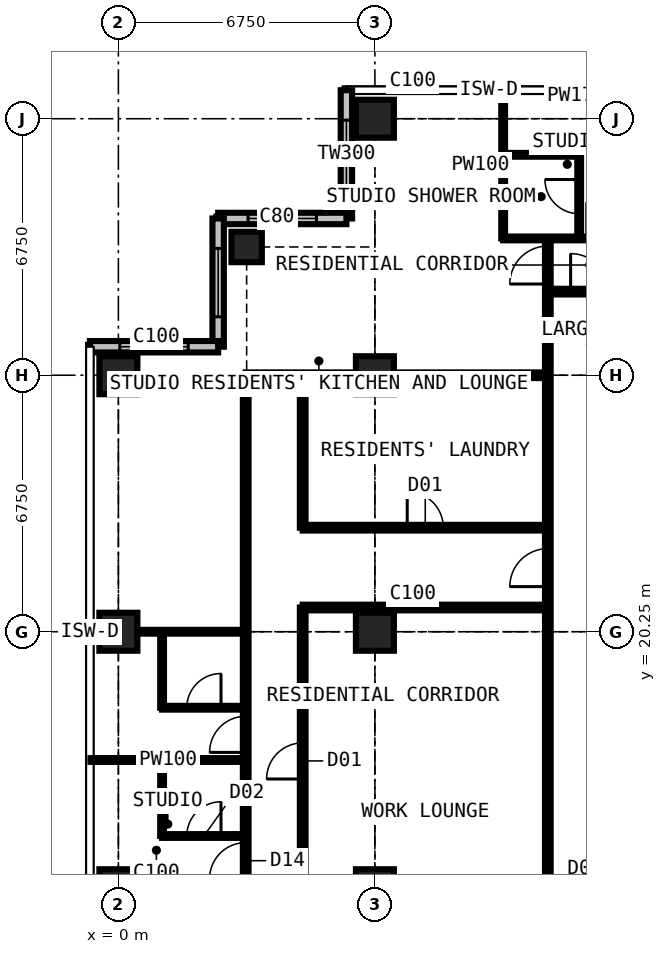
"""IFC4 building model, lengths in metres.
Left out: names, types, materials, properties, quantities, classifications, styles, units other than length and angle.
Written with IfcOpenShell. Run it as: python <this file> out.ifc"""

import sys

from ifc_helpers import new_model, si_unit, direction, frame, frame_2d, origin, origin_2d, place, context, subcontext, project, spatial, rectangle, extrude, element, fill, save


model = new_model("IFC4")
c1 = context("Model", 3, precision=1e-05, world=origin(), true_north=direction((0.0, 1.0)))
c2 = subcontext(c1, "Body", "Model", "MODEL_VIEW")
j1 = project(units=[si_unit("LENGTHUNIT", "METRE"), si_unit("PLANEANGLEUNIT", "RADIAN")], contexts=[c1])
p1 = place(None, origin())
s1 = spatial("IfcSite", under=j1, at=p1, CompositionType="ELEMENT")
p2 = place(p1, origin())
s2 = spatial("IfcBuilding", under=s1, at=p2, CompositionType="ELEMENT")
p3 = place(p2, frame((0.0, 0.0, 247.5)))
s3 = spatial("IfcBuildingStorey", under=s2, at=p3, CompositionType="ELEMENT", Elevation=247.5)
for number, where, z_axis, x_axis in (
    (1, (0.0, 13.5, 0.0), (0.0, 0.0, 1.0), (1.0, 0.0, 0.0)),
    (2, (0.0, 20.25, 0.0), (0.0, 0.0, 1.0), (1.0, 0.0, 0.0)),
    (3, (0.0, 27.0, 0.0), (0.0, 0.0, 1.0), (1.0, 0.0, 0.0)),
):
    element("IfcColumn", number, at=place(p3, frame(where, z_axis=z_axis, x_axis=x_axis)), inside=s3, PredefinedType="COLUMN", context=c2, shape_type="SweptSolid", body=[
        extrude(rectangle(XDim=1.0, YDim=1.0, at=origin_2d()), origin(), (0.0, 0.0, 1.0), 3.6),
    ])
p4 = place(p3, frame((3.375, 30.375, 0.0), z_axis=(0.0, 0.0, 1.0), x_axis=(1.0, 0.0, 0.0)))
e4 = element("IfcColumn", 4, at=p4, inside=s3, PredefinedType="COLUMN", context=c2, shape_type="SweptSolid", body=[
    extrude(rectangle(XDim=0.8, YDim=0.8, at=origin_2d()), origin(), (0.0, 0.0, 1.0), 3.6),
])
for number, where, z_axis, x_axis in (
    (5, (6.75, 13.5, 0.0), (0.0, 0.0, 1.0), (1.0, 0.0, 0.0)),
    (6, (6.75, 20.25, 0.0), (0.0, 0.0, 1.0), (1.0, 0.0, 0.0)),
    (7, (6.75, 27.0, 0.0), (0.0, 0.0, 1.0), (1.0, 0.0, 0.0)),
    (8, (6.75, 33.75, 0.0), (0.0, 0.0, 1.0), (1.0, 0.0, 0.0)),
):
    element("IfcColumn", number, at=place(p3, frame(where, z_axis=z_axis, x_axis=x_axis)), inside=s3, PredefinedType="COLUMN", context=c2, shape_type="SweptSolid", body=[
        extrude(rectangle(XDim=1.0, YDim=1.0, at=origin_2d()), origin(), (0.0, 0.0, 1.0), 3.6),
    ])
p5 = place(p3, frame((6.0, 34.5, 0.0), z_axis=(0.0, 0.0, 1.0), x_axis=(0.0, -1.0, 0.0)))
e9 = element("IfcWall", 9, at=p5, inside=s3, PredefinedType="SOLIDWALL", context=c2, shape_type="SweptSolid", body=[
    extrude(rectangle(XDim=3.375, YDim=0.3, at=frame_2d((1.688, 0.0))), origin(), (0.0, 0.0, 1.0), 3.375),
])
p6 = place(p5, frame((0.788, 0.0, 0.6)))
e10 = element("IfcOpeningElement", 10, at=p6, cuts=e9, PredefinedType="OPENING", context=c2, shape_type="SweptSolid", body=[
    extrude(rectangle(XDim=1.8, YDim=2.1, at=frame_2d((0.9, 1.05))), frame((0.0, 0.16, 0.0), z_axis=(0.0, -1.0, 0.0), x_axis=(1.0, 0.0, 0.0)), (0.0, 0.0, 1.0), 0.32),
])
p7 = place(p3, frame((6.0, 31.125, 0.0), z_axis=(0.0, 0.0, 1.0), x_axis=(-1.0, 0.0, 0.0)))
e11 = element("IfcWall", 11, at=p7, inside=s3, PredefinedType="SOLIDWALL", context=c2, shape_type="SweptSolid", body=[
    extrude(rectangle(XDim=3.375, YDim=0.3, at=frame_2d((1.688, 0.0))), origin(), (0.0, 0.0, 1.0), 3.375),
])
p8 = place(p7, frame((0.788, 0.0, 0.6)))
e12 = element("IfcOpeningElement", 12, at=p8, cuts=e11, PredefinedType="OPENING", context=c2, shape_type="SweptSolid", body=[
    extrude(rectangle(XDim=1.8, YDim=2.1, at=frame_2d((0.9, 1.05))), frame((0.0, 0.16, 0.0), z_axis=(0.0, -1.0, 0.0), x_axis=(1.0, 0.0, 0.0)), (0.0, 0.0, 1.0), 0.32),
])
p9 = place(p3, frame((2.625, 31.125, 0.0), z_axis=(0.0, 0.0, 1.0), x_axis=(0.0, -1.0, 0.0)))
e13 = element("IfcWall", 13, at=p9, inside=s3, PredefinedType="SOLIDWALL", context=c2, shape_type="SweptSolid", body=[
    extrude(rectangle(XDim=3.375, YDim=0.3, at=frame_2d((1.688, 0.0))), origin(), (0.0, 0.0, 1.0), 3.375),
])
p10 = place(p9, frame((0.788, 0.0, 0.6)))
e14 = element("IfcOpeningElement", 14, at=p10, cuts=e13, PredefinedType="OPENING", context=c2, shape_type="SweptSolid", body=[
    extrude(rectangle(XDim=1.8, YDim=2.1, at=frame_2d((0.9, 1.05))), frame((0.0, 0.16, 0.0), z_axis=(0.0, -1.0, 0.0), x_axis=(1.0, 0.0, 0.0)), (0.0, 0.0, 1.0), 0.32),
])
p11 = place(p3, frame((2.625, 27.75, 0.0), z_axis=(0.0, 0.0, 1.0), x_axis=(-1.0, 0.0, 0.0)))
e15 = element("IfcWall", 15, at=p11, inside=s3, PredefinedType="SOLIDWALL", context=c2, shape_type="SweptSolid", body=[
    extrude(rectangle(XDim=3.375, YDim=0.3, at=frame_2d((1.688, 0.0))), origin(), (0.0, 0.0, 1.0), 3.375),
])
p12 = place(p11, frame((0.788, 0.0, 0.6)))
e16 = element("IfcOpeningElement", 16, at=p12, cuts=e15, PredefinedType="OPENING", context=c2, shape_type="SweptSolid", body=[
    extrude(rectangle(XDim=1.8, YDim=2.1, at=frame_2d((0.9, 1.05))), frame((0.0, 0.16, 0.0), z_axis=(0.0, -1.0, 0.0), x_axis=(1.0, 0.0, 0.0)), (0.0, 0.0, 1.0), 0.32),
])
p13 = place(p3, frame((-0.734, 16.875, 0.0), z_axis=(0.0, 0.0, 1.0), x_axis=(1.0, 0.0, 0.0)))
e17 = element("IfcWall", 17, at=p13, inside=s3, PredefinedType="PARTITIONING", context=c2, shape_type="SweptSolid", body=[
    extrude(rectangle(XDim=4.084, YDim=0.1, at=frame_2d((2.042, 0.0))), origin(), (0.0, 0.0, 1.0), 3.375),
])
p14 = place(p3, frame((-0.734, 20.25, 0.0), z_axis=(0.0, 0.0, 1.0), x_axis=(1.0, 0.0, 0.0)))
e18 = element("IfcWall", 18, at=p14, inside=s3, PredefinedType="PARTITIONING", context=c2, shape_type="SweptSolid", body=[
    extrude(rectangle(XDim=4.084, YDim=0.1, at=frame_2d((2.042, 0.0))), origin(), (0.0, 0.0, 1.0), 2.877),
])
p15 = place(p3, frame((1.15, 14.875, 0.0), z_axis=(0.0, 0.0, 1.0), x_axis=(0.0, 1.0, 0.0)))
e19 = element("IfcWall", 19, at=p15, inside=s3, PredefinedType="PARTITIONING", context=c2, shape_type="SweptSolid", body=[
    extrude(rectangle(XDim=2.0, YDim=0.1, at=frame_2d((1.0, 0.0))), origin(), (0.0, 0.0, 1.0), 3.375),
])
p16 = place(p3, frame((1.15, 14.875, 0.0), z_axis=(0.0, 0.0, 1.0), x_axis=(1.0, 0.0, 0.0)))
e20 = element("IfcWall", 20, at=p16, inside=s3, PredefinedType="PARTITIONING", context=c2, shape_type="SweptSolid", body=[
    extrude(rectangle(XDim=2.2, YDim=0.1, at=frame_2d((1.1, 0.0))), origin(), (0.0, 0.0, 1.0), 3.375),
])
p17 = place(p16, frame((0.65, 0.0, 0.0)))
e21 = element("IfcOpeningElement", 21, at=p17, cuts=e20, PredefinedType="OPENING", context=c2, shape_type="SweptSolid", body=[
    extrude(rectangle(XDim=0.9, YDim=2.2, at=frame_2d((0.45, 1.1))), frame((0.0, 0.06, 0.0), z_axis=(0.0, -1.0, 0.0), x_axis=(1.0, 0.0, 0.0)), (0.0, 0.0, 1.0), 0.12),
])
p18 = place(p3, frame((1.15, 18.25, 0.0), z_axis=(0.0, 0.0, 1.0), x_axis=(0.0, 1.0, 0.0)))
e22 = element("IfcWall", 22, at=p18, inside=s3, PredefinedType="PARTITIONING", context=c2, shape_type="SweptSolid", body=[
    extrude(rectangle(XDim=2.0, YDim=0.1, at=frame_2d((1.0, 0.0))), origin(), (0.0, 0.0, 1.0), 3.375),
])
p19 = place(p3, frame((1.15, 18.25, 0.0), z_axis=(0.0, 0.0, 1.0), x_axis=(1.0, 0.0, 0.0)))
e23 = element("IfcWall", 23, at=p19, inside=s3, PredefinedType="PARTITIONING", context=c2, shape_type="SweptSolid", body=[
    extrude(rectangle(XDim=2.2, YDim=0.1, at=frame_2d((1.1, 0.0))), origin(), (0.0, 0.0, 1.0), 3.375),
])
p20 = place(p19, frame((0.65, 0.0, 0.0)))
e24 = element("IfcOpeningElement", 24, at=p20, cuts=e23, PredefinedType="OPENING", context=c2, shape_type="SweptSolid", body=[
    extrude(rectangle(XDim=0.9, YDim=2.2, at=frame_2d((0.45, 1.1))), frame((0.0, 0.06, 0.0), z_axis=(0.0, -1.0, 0.0), x_axis=(1.0, 0.0, 0.0)), (0.0, 0.0, 1.0), 0.12),
])
p21 = place(p3, frame((3.35, 13.5, 0.0), z_axis=(0.0, 0.0, 1.0), x_axis=(0.0, 1.0, 0.0)))
e25 = element("IfcWall", 25, at=p21, inside=s3, PredefinedType="PARTITIONING", context=c2, shape_type="SweptSolid", body=[
    extrude(rectangle(XDim=13.5, YDim=0.15, at=frame_2d((6.75, 0.0))), origin(), (0.0, 0.0, 1.0), 3.375),
])
p22 = place(p21, frame((0.25, 0.0, 0.0)))
e26 = element("IfcOpeningElement", 26, at=p22, cuts=e25, PredefinedType="OPENING", context=c2, shape_type="SweptSolid", body=[
    extrude(rectangle(XDim=0.95, YDim=2.2, at=frame_2d((0.475, 1.1))), frame((0.0, 0.085, 0.0), z_axis=(0.0, -1.0, 0.0), x_axis=(1.0, 0.0, 0.0)), (0.0, 0.0, 1.0), 0.17),
])
p23 = place(p21, frame((3.575, 0.0, 0.0)))
e27 = element("IfcOpeningElement", 27, at=p23, cuts=e25, PredefinedType="OPENING", context=c2, shape_type="SweptSolid", body=[
    extrude(rectangle(XDim=0.95, YDim=2.2, at=frame_2d((0.475, 1.1))), frame((0.0, 0.085, 0.0), z_axis=(0.0, -1.0, 0.0), x_axis=(1.0, 0.0, 0.0)), (0.0, 0.0, 1.0), 0.17),
])
p24 = place(p3, frame((3.35, 27.0, 0.0), z_axis=(0.0, 0.0, 1.0), x_axis=(1.0, 0.0, 0.0)))
e28 = element("IfcWall", 28, at=p24, inside=s3, PredefinedType="PARTITIONING", context=c2, shape_type="SweptSolid", body=[
    extrude(rectangle(XDim=7.95, YDim=0.15, at=frame_2d((3.975, 0.0))), origin(), (0.0, 0.0, 1.0), 2.877),
])
p25 = place(p3, frame((4.85, 12.775, 0.0), z_axis=(0.0, 0.0, 1.0), x_axis=(0.0, 1.0, 0.0)))
e29 = element("IfcWall", 29, at=p25, inside=s3, PredefinedType="PARTITIONING", context=c2, shape_type="SweptSolid", body=[
    extrude(rectangle(XDim=8.113, YDim=0.15, at=frame_2d((4.056, 0.0))), origin(), (0.0, 0.0, 1.0), 3.375),
])
p26 = place(p25, frame((3.6, 0.0, 0.0)))
e30 = element("IfcOpeningElement", 30, at=p26, cuts=e29, PredefinedType="OPENING", context=c2, shape_type="SweptSolid", body=[
    extrude(rectangle(XDim=0.95, YDim=2.2, at=frame_2d((0.475, 1.1))), frame((0.0, 0.085, 0.0), z_axis=(0.0, -1.0, 0.0), x_axis=(1.0, 0.0, 0.0)), (0.0, 0.0, 1.0), 0.17),
])
p27 = place(p3, frame((4.85, 20.887, 0.0), z_axis=(0.0, 0.0, 1.0), x_axis=(1.0, 0.0, 0.0)))
e31 = element("IfcWall", 31, at=p27, inside=s3, PredefinedType="PARTITIONING", context=c2, shape_type="SweptSolid", body=[
    extrude(rectangle(XDim=6.45, YDim=0.15, at=frame_2d((3.225, 0.0))), origin(), (0.0, 0.0, 1.0), 3.375),
])
p28 = place(p3, frame((4.85, 22.988, 0.0), z_axis=(0.0, 0.0, 1.0), x_axis=(0.0, 1.0, 0.0)))
e32 = element("IfcWall", 32, at=p28, inside=s3, PredefinedType="PARTITIONING", context=c2, shape_type="SweptSolid", body=[
    extrude(rectangle(XDim=4.012, YDim=0.15, at=frame_2d((2.006, 0.0))), origin(), (0.0, 0.0, 1.0), 3.375),
])
p29 = place(p3, frame((4.85, 22.988, 0.0), z_axis=(0.0, 0.0, 1.0), x_axis=(1.0, 0.0, 0.0)))
e33 = element("IfcWall", 33, at=p29, inside=s3, PredefinedType="PARTITIONING", context=c2, shape_type="SweptSolid", body=[
    extrude(rectangle(XDim=6.45, YDim=0.15, at=frame_2d((3.225, 0.0))), origin(), (0.0, 0.0, 1.0), 3.375),
])
p30 = place(p29, frame((2.75, 0.0, 0.0)))
e34 = element("IfcOpeningElement", 34, at=p30, cuts=e33, PredefinedType="OPENING", context=c2, shape_type="SweptSolid", body=[
    extrude(rectangle(XDim=0.95, YDim=2.2, at=frame_2d((0.475, 1.1))), frame((0.0, 0.085, 0.0), z_axis=(0.0, -1.0, 0.0), x_axis=(1.0, 0.0, 0.0)), (0.0, 0.0, 1.0), 0.17),
])
p31 = place(p3, frame((10.125, 30.6, 0.0), z_axis=(0.0, 0.0, 1.0), x_axis=(0.0, 1.0, 0.0)))
e35 = element("IfcWall", 35, at=p31, inside=s3, PredefinedType="PARTITIONING", context=c2, shape_type="SweptSolid", body=[
    extrude(rectangle(XDim=3.884, YDim=0.1, at=frame_2d((1.942, 0.0))), origin(), (0.0, 0.0, 1.0), 3.375),
])
p32 = place(p3, frame((10.125, 30.6, 0.0), z_axis=(0.0, 0.0, 1.0), x_axis=(1.0, 0.0, 0.0)))
e36 = element("IfcWall", 36, at=p32, inside=s3, PredefinedType="PARTITIONING", context=c2, shape_type="SweptSolid", body=[
    extrude(rectangle(XDim=3.375, YDim=0.1, at=frame_2d((1.688, 0.0))), origin(), (0.0, 0.0, 1.0), 3.375),
])
p33 = place(p32, frame((2.2, 0.0, 0.0)))
e37 = element("IfcOpeningElement", 37, at=p33, cuts=e36, PredefinedType="OPENING", context=c2, shape_type="SweptSolid", body=[
    extrude(rectangle(XDim=0.95, YDim=2.2, at=frame_2d((0.475, 1.1))), frame((0.0, 0.06, 0.0), z_axis=(0.0, -1.0, 0.0), x_axis=(1.0, 0.0, 0.0)), (0.0, 0.0, 1.0), 0.12),
])
p34 = place(p3, frame((10.125, 32.8, 0.0), z_axis=(0.0, 0.0, 1.0), x_axis=(1.0, 0.0, 0.0)))
e38 = element("IfcWall", 38, at=p34, inside=s3, PredefinedType="PARTITIONING", context=c2, shape_type="SweptSolid", body=[
    extrude(rectangle(XDim=2.0, YDim=0.1, at=frame_2d((1.0, 0.0))), origin(), (0.0, 0.0, 1.0), 3.375),
])
p35 = place(p3, frame((11.3, 11.3, 0.0), z_axis=(0.0, 0.0, 1.0), x_axis=(0.0, 1.0, 0.0)))
e39 = element("IfcWall", 39, at=p35, inside=s3, PredefinedType="PARTITIONING", context=c2, shape_type="SweptSolid", body=[
    extrude(rectangle(XDim=19.3, YDim=0.15, at=frame_2d((9.65, 0.0))), origin(), (0.0, 0.0, 1.0), 3.375),
])
p36 = place(p35, frame((18.1, 0.0, 0.0)))
e40 = element("IfcOpeningElement", 40, at=p36, cuts=e39, PredefinedType="OPENING", context=c2, shape_type="SweptSolid", body=[
    extrude(rectangle(XDim=1.0, YDim=2.2, at=frame_2d((0.5, 1.1))), frame((0.0, 0.085, 0.0), z_axis=(0.0, -1.0, 0.0), x_axis=(1.0, 0.0, 0.0)), (0.0, 0.0, 1.0), 0.17),
])
p37 = place(p35, frame((10.137, 0.0, 0.0)))
e41 = element("IfcOpeningElement", 41, at=p37, cuts=e39, PredefinedType="OPENING", context=c2, shape_type="SweptSolid", body=[
    extrude(rectangle(XDim=1.0, YDim=2.2, at=frame_2d((0.5, 1.1))), frame((0.0, 0.085, 0.0), z_axis=(0.0, -1.0, 0.0), x_axis=(1.0, 0.0, 0.0)), (0.0, 0.0, 1.0), 0.17),
])
p38 = place(p3, frame((11.3, 29.2, 0.0), z_axis=(0.0, 0.0, 1.0), x_axis=(1.0, 0.0, 0.0)))
e42 = element("IfcWall", 42, at=p38, inside=s3, PredefinedType="PARTITIONING", context=c2, shape_type="SweptSolid", body=[
    extrude(rectangle(XDim=19.809, YDim=0.15, at=frame_2d((9.904, 0.0))), origin(), (0.0, 0.0, 1.0), 3.375),
])
p39 = place(p38, frame((14.625, 0.0, 0.0)))
e43 = element("IfcOpeningElement", 43, at=p39, cuts=e42, PredefinedType="OPENING", context=c2, shape_type="SweptSolid", body=[
    extrude(rectangle(XDim=1.0, YDim=2.2, at=frame_2d((0.5, 1.1))), frame((0.0, 0.085, 0.0), z_axis=(0.0, -1.0, 0.0), x_axis=(1.0, 0.0, 0.0)), (0.0, 0.0, 1.0), 0.17),
])
p40 = place(p38, frame((6.4, 0.0, 0.0)))
e44 = element("IfcOpeningElement", 44, at=p40, cuts=e42, PredefinedType="OPENING", context=c2, shape_type="SweptSolid", body=[
    extrude(rectangle(XDim=0.95, YDim=2.2, at=frame_2d((0.475, 1.1))), frame((0.0, 0.085, 0.0), z_axis=(0.0, -1.0, 0.0), x_axis=(1.0, 0.0, 0.0)), (0.0, 0.0, 1.0), 0.17),
])
p41 = place(p38, frame((9.2, 0.0, 0.0)))
e45 = element("IfcOpeningElement", 45, at=p41, cuts=e42, PredefinedType="OPENING", context=c2, shape_type="SweptSolid", body=[
    extrude(rectangle(XDim=0.95, YDim=2.2, at=frame_2d((0.475, 1.1))), frame((0.0, 0.085, 0.0), z_axis=(0.0, -1.0, 0.0), x_axis=(1.0, 0.0, 0.0)), (0.0, 0.0, 1.0), 0.17),
])
p42 = place(p38, frame((0.6, 0.0, 0.0)))
e46 = element("IfcOpeningElement", 46, at=p42, cuts=e42, PredefinedType="OPENING", context=c2, shape_type="SweptSolid", body=[
    extrude(rectangle(XDim=1.0, YDim=2.2, at=frame_2d((0.5, 1.1))), frame((0.0, 0.085, 0.0), z_axis=(0.0, -1.0, 0.0), x_axis=(1.0, 0.0, 0.0)), (0.0, 0.0, 1.0), 0.17),
])
p43 = place(p3, frame((12.125, 30.6, 0.0), z_axis=(0.0, 0.0, 1.0), x_axis=(0.0, 1.0, 0.0)))
e47 = element("IfcWall", 47, at=p43, inside=s3, PredefinedType="PARTITIONING", context=c2, shape_type="SweptSolid", body=[
    extrude(rectangle(XDim=2.2, YDim=0.1, at=frame_2d((1.1, 0.0))), origin(), (0.0, 0.0, 1.0), 3.375),
])
p44 = place(p43, frame((0.65, 0.0, 0.0)))
e48 = element("IfcOpeningElement", 48, at=p44, cuts=e47, PredefinedType="OPENING", context=c2, shape_type="SweptSolid", body=[
    extrude(rectangle(XDim=0.9, YDim=2.2, at=frame_2d((0.45, 1.1))), frame((0.0, 0.06, 0.0), z_axis=(0.0, -1.0, 0.0), x_axis=(1.0, 0.0, 0.0)), (0.0, 0.0, 1.0), 0.12),
])
p45 = place(p6, origin())
e49 = element("IfcWindow", 49, at=p45, inside=s3, PartitioningType="SINGLE_PANEL", PredefinedType="WINDOW", context=c2, shape_type="SweptSolid", body=[
    extrude(rectangle(XDim=1.8, YDim=2.1, at=frame_2d((0.9, 1.05))), frame((0.0, 0.03, 0.0), z_axis=(0.0, -1.0, 0.0), x_axis=(1.0, 0.0, 0.0)), (0.0, 0.0, 1.0), 0.06),
])
fill(e10, e49)
p46 = place(p8, origin())
e50 = element("IfcWindow", 50, at=p46, inside=s3, PartitioningType="SINGLE_PANEL", PredefinedType="WINDOW", context=c2, shape_type="SweptSolid", body=[
    extrude(rectangle(XDim=1.8, YDim=2.1, at=frame_2d((0.9, 1.05))), frame((0.0, 0.03, 0.0), z_axis=(0.0, -1.0, 0.0), x_axis=(1.0, 0.0, 0.0)), (0.0, 0.0, 1.0), 0.06),
])
fill(e12, e50)
p47 = place(p10, origin())
e51 = element("IfcWindow", 51, at=p47, inside=s3, PartitioningType="SINGLE_PANEL", PredefinedType="WINDOW", context=c2, shape_type="SweptSolid", body=[
    extrude(rectangle(XDim=1.8, YDim=2.1, at=frame_2d((0.9, 1.05))), frame((0.0, 0.03, 0.0), z_axis=(0.0, -1.0, 0.0), x_axis=(1.0, 0.0, 0.0)), (0.0, 0.0, 1.0), 0.06),
])
fill(e14, e51)
p48 = place(p12, origin())
e52 = element("IfcWindow", 52, at=p48, inside=s3, PartitioningType="SINGLE_PANEL", PredefinedType="WINDOW", context=c2, shape_type="SweptSolid", body=[
    extrude(rectangle(XDim=1.8, YDim=2.1, at=frame_2d((0.9, 1.05))), frame((0.0, 0.03, 0.0), z_axis=(0.0, -1.0, 0.0), x_axis=(1.0, 0.0, 0.0)), (0.0, 0.0, 1.0), 0.06),
])
fill(e16, e52)
p49 = place(p44, origin())
e53 = element("IfcDoor", 53, at=p49, inside=s3, OperationType="SINGLE_SWING_RIGHT", PredefinedType="DOOR", context=c2, shape_type="SweptSolid", body=[
    extrude(rectangle(XDim=0.9, YDim=2.2, at=frame_2d((0.45, 1.1))), frame((0.0, 0.025, 0.0), z_axis=(0.0, -1.0, 0.0), x_axis=(1.0, 0.0, 0.0)), (0.0, 0.0, 1.0), 0.05),
])
fill(e48, e53)
p50 = place(p42, origin())
e54 = element("IfcDoor", 54, at=p50, inside=s3, OperationType="SINGLE_SWING_LEFT", PredefinedType="DOOR", context=c2, shape_type="SweptSolid", body=[
    extrude(rectangle(XDim=1.0, YDim=2.2, at=frame_2d((0.5, 1.1))), frame((0.0, 0.025, 0.0), z_axis=(0.0, -1.0, 0.0), x_axis=(1.0, 0.0, 0.0)), (0.0, 0.0, 1.0), 0.05),
])
fill(e46, e54)
p51 = place(p36, origin())
e55 = element("IfcDoor", 55, at=p51, inside=s3, OperationType="SINGLE_SWING_LEFT", PredefinedType="DOOR", context=c2, shape_type="SweptSolid", body=[
    extrude(rectangle(XDim=1.0, YDim=2.2, at=frame_2d((0.5, 1.1))), frame((0.0, 0.025, 0.0), z_axis=(0.0, -1.0, 0.0), x_axis=(1.0, 0.0, 0.0)), (0.0, 0.0, 1.0), 0.05),
])
fill(e40, e55)
p52 = place(p22, origin())
e56 = element("IfcDoor", 56, at=p52, inside=s3, OperationType="SINGLE_SWING_LEFT", PredefinedType="DOOR", context=c2, shape_type="SweptSolid", body=[
    extrude(rectangle(XDim=0.95, YDim=2.2, at=frame_2d((0.475, 1.1))), frame((0.0, 0.025, 0.0), z_axis=(0.0, -1.0, 0.0), x_axis=(1.0, 0.0, 0.0)), (0.0, 0.0, 1.0), 0.05),
])
fill(e26, e56)
p53 = place(p17, origin())
e57 = element("IfcDoor", 57, at=p53, inside=s3, OperationType="SINGLE_SWING_RIGHT", PredefinedType="DOOR", context=c2, shape_type="SweptSolid", body=[
    extrude(rectangle(XDim=0.9, YDim=2.2, at=frame_2d((0.45, 1.1))), frame((0.0, 0.025, 0.0), z_axis=(0.0, -1.0, 0.0), x_axis=(1.0, 0.0, 0.0)), (0.0, 0.0, 1.0), 0.05),
])
fill(e21, e57)
p54 = place(p23, origin())
e58 = element("IfcDoor", 58, at=p54, inside=s3, OperationType="SINGLE_SWING_LEFT", PredefinedType="DOOR", context=c2, shape_type="SweptSolid", body=[
    extrude(rectangle(XDim=0.95, YDim=2.2, at=frame_2d((0.475, 1.1))), frame((0.0, 0.025, 0.0), z_axis=(0.0, -1.0, 0.0), x_axis=(1.0, 0.0, 0.0)), (0.0, 0.0, 1.0), 0.05),
])
fill(e27, e58)
p55 = place(p20, origin())
e59 = element("IfcDoor", 59, at=p55, inside=s3, OperationType="SINGLE_SWING_RIGHT", PredefinedType="DOOR", context=c2, shape_type="SweptSolid", body=[
    extrude(rectangle(XDim=0.9, YDim=2.2, at=frame_2d((0.45, 1.1))), frame((0.0, 0.025, 0.0), z_axis=(0.0, -1.0, 0.0), x_axis=(1.0, 0.0, 0.0)), (0.0, 0.0, 1.0), 0.05),
])
fill(e24, e59)
p56 = place(p37, origin())
e60 = element("IfcDoor", 60, at=p56, inside=s3, OperationType="SINGLE_SWING_LEFT", PredefinedType="DOOR", context=c2, shape_type="SweptSolid", body=[
    extrude(rectangle(XDim=1.0, YDim=2.2, at=frame_2d((0.5, 1.1))), frame((0.0, 0.025, 0.0), z_axis=(0.0, -1.0, 0.0), x_axis=(1.0, 0.0, 0.0)), (0.0, 0.0, 1.0), 0.05),
])
fill(e41, e60)
p57 = place(p30, origin())
e61 = element("IfcDoor", 61, at=p57, inside=s3, OperationType="SINGLE_SWING_LEFT", PredefinedType="DOOR", context=c2, shape_type="SweptSolid", body=[
    extrude(rectangle(XDim=0.95, YDim=2.2, at=frame_2d((0.475, 1.1))), frame((0.0, 0.025, 0.0), z_axis=(0.0, -1.0, 0.0), x_axis=(1.0, 0.0, 0.0)), (0.0, 0.0, 1.0), 0.05),
])
fill(e34, e61)
p58 = place(p26, origin())
e62 = element("IfcDoor", 62, at=p58, inside=s3, OperationType="SINGLE_SWING_LEFT", PredefinedType="DOOR", context=c2, shape_type="SweptSolid", body=[
    extrude(rectangle(XDim=0.95, YDim=2.2, at=frame_2d((0.475, 1.1))), frame((0.0, 0.025, 0.0), z_axis=(0.0, -1.0, 0.0), x_axis=(1.0, 0.0, 0.0)), (0.0, 0.0, 1.0), 0.05),
])
fill(e30, e62)
save(model, sys.argv[1])
